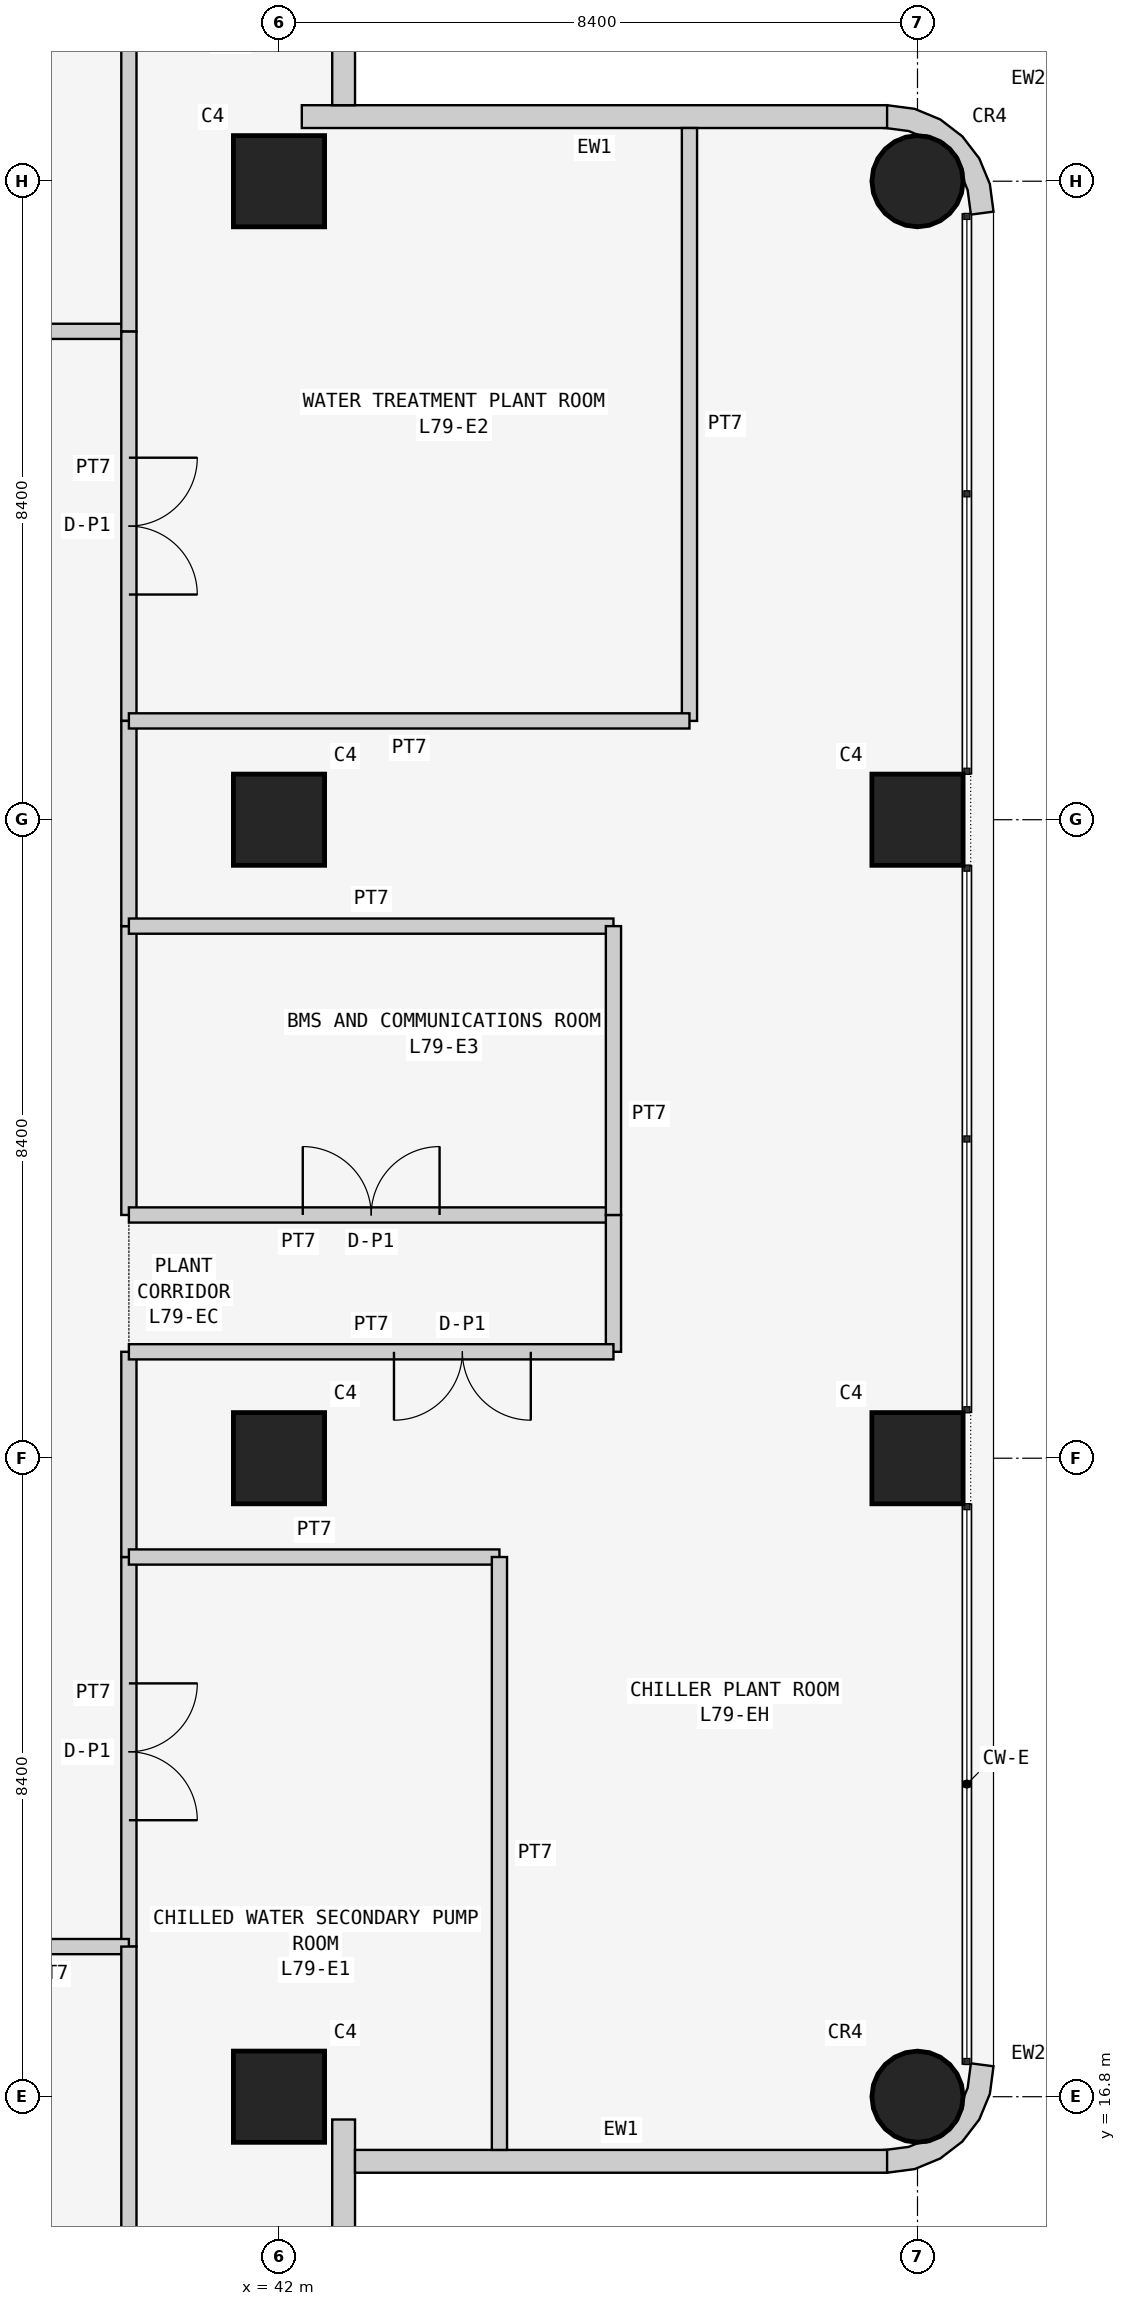
"""IFC4 building model, lengths in metres.
Left out: names, types, materials, properties, quantities, classifications, styles, units other than length and angle.
Written with IfcOpenShell. Run it as: python <this file> out.ifc"""

import sys

from ifc_helpers import new_model, si_unit, direction, frame, frame_2d, origin, origin_2d, place, context, subcontext, project, spatial, polyline, rectangle, circle, outline, extrude, element, fill, save


model = new_model("IFC4")
c1 = context("Model", 3, precision=1e-05, world=origin(), true_north=direction((0.0, 1.0)))
c2 = subcontext(c1, "Body", "Model", "MODEL_VIEW")
j1 = project(units=[si_unit("LENGTHUNIT", "METRE"), si_unit("PLANEANGLEUNIT", "RADIAN")], contexts=[c1])
p1 = place(None, origin())
s1 = spatial("IfcSite", under=j1, at=p1, CompositionType="ELEMENT")
p2 = place(p1, origin())
s2 = spatial("IfcBuilding", under=s1, at=p2, CompositionType="ELEMENT")
p3 = place(p2, frame((0.0, 0.0, 300.9)))
s3 = spatial("IfcBuildingStorey", under=s2, at=p3, CompositionType="ELEMENT", Elevation=300.9)
for number, where, z_axis, x_axis in (
    (1, (42.0, 16.8, 0.0), (0.0, 0.0, 1.0), (1.0, 0.0, 0.0)),
    (2, (42.0, 25.2, 0.0), (0.0, 0.0, 1.0), (1.0, 0.0, 0.0)),
    (3, (42.0, 33.6, 0.0), (0.0, 0.0, 1.0), (1.0, 0.0, 0.0)),
    (4, (42.0, 42.0, 0.0), (0.0, 0.0, 1.0), (1.0, 0.0, 0.0)),
):
    element("IfcColumn", number, at=place(p3, frame(where, z_axis=z_axis, x_axis=x_axis)), inside=s3, PredefinedType="COLUMN", context=c2, shape_type="SweptSolid", body=[
        extrude(rectangle(XDim=1.2, YDim=1.2, at=origin_2d()), origin(), (0.0, 0.0, 1.0), 4.5),
    ])
p4 = place(p3, frame((50.4, 16.8, 0.0), z_axis=(0.0, 0.0, 1.0), x_axis=(1.0, 0.0, 0.0)))
e5 = element("IfcColumn", 5, at=p4, inside=s3, PredefinedType="COLUMN", context=c2, shape_type="SweptSolid", body=[
    extrude(circle(Radius=0.6, at=origin_2d()), origin(), (0.0, 0.0, 1.0), 4.5),
])
for number, where, z_axis, x_axis in (
    (6, (50.4, 25.2, 0.0), (0.0, 0.0, 1.0), (1.0, 0.0, 0.0)),
    (7, (50.4, 33.6, 0.0), (0.0, 0.0, 1.0), (1.0, 0.0, 0.0)),
):
    element("IfcColumn", number, at=place(p3, frame(where, z_axis=z_axis, x_axis=x_axis)), inside=s3, PredefinedType="COLUMN", context=c2, shape_type="SweptSolid", body=[
        extrude(rectangle(XDim=1.2, YDim=1.2, at=origin_2d()), origin(), (0.0, 0.0, 1.0), 4.5),
    ])
p5 = place(p3, frame((50.4, 42.0, 0.0), z_axis=(0.0, 0.0, 1.0), x_axis=(1.0, 0.0, 0.0)))
e8 = element("IfcColumn", 8, at=p5, inside=s3, PredefinedType="COLUMN", context=c2, shape_type="SweptSolid", body=[
    extrude(circle(Radius=0.6, at=origin_2d()), origin(), (0.0, 0.0, 1.0), 4.5),
])
p6 = place(p3, frame((42.85, 8.8, 0.0), z_axis=(0.0, 0.0, 1.0), x_axis=(0.0, 1.0, 0.0)))
e9 = element("IfcWall", 9, at=p6, inside=s3, PredefinedType="SOLIDWALL", context=c2, shape_type="SweptSolid", body=[
    extrude(rectangle(XDim=7.7, YDim=0.3, at=frame_2d((3.85, 0.0))), origin(), (0.0, 0.0, 1.0), 4.25),
])
p7 = place(p3, frame((43.0, 15.95, 0.0), z_axis=(0.0, 0.0, 1.0), x_axis=(1.0, 0.0, 0.0)))
e10 = element("IfcWall", 10, at=p7, inside=s3, PredefinedType="SOLIDWALL", context=c2, shape_type="SweptSolid", body=[
    extrude(rectangle(XDim=7.0, YDim=0.3, at=frame_2d((3.5, 0.0))), origin(), (0.0, 0.0, 1.0), 4.25),
])
p8 = place(p3, frame((50.0, 42.85, 0.0), z_axis=(0.0, 0.0, 1.0), x_axis=(-1.0, 0.0, 0.0)))
e11 = element("IfcWall", 11, at=p8, inside=s3, PredefinedType="SOLIDWALL", context=c2, shape_type="SweptSolid", body=[
    extrude(rectangle(XDim=7.7, YDim=0.3, at=frame_2d((3.85, 0.0))), origin(), (0.0, 0.0, 1.0), 4.25),
])
p9 = place(p3, frame((42.85, 43.0, 0.0), z_axis=(0.0, 0.0, 1.0), x_axis=(0.0, 1.0, 0.0)))
e12 = element("IfcWall", 12, at=p9, inside=s3, PredefinedType="SOLIDWALL", context=c2, shape_type="SweptSolid", body=[
    extrude(rectangle(XDim=7.0, YDim=0.3, at=frame_2d((3.5, 0.0))), origin(), (0.0, 0.0, 1.0), 4.25),
])
p10 = place(p3, frame((50.038, 16.224, 0.0), z_axis=(0.0, 0.0, 1.0), x_axis=(0.707106781187, -0.707106781187, 0.0)))
e13 = element("IfcWall", 13, at=p10, inside=s3, PredefinedType="SOLIDWALL", context=c2, shape_type="SweptSolid", body=[
    extrude(outline(polyline([(0.047, 1.455), (0.233, 1.212), (0.292, 1.069), (0.358, 1.003), (0.449, 0.782), (0.449, 0.543), (0.358, 0.322), (0.292, 0.257), (0.233, 0.114), (0.047, -0.129), (0.033, -0.143), (0.273, -0.327), (0.495, -0.037), (0.635, 0.301), (0.683, 0.663), (0.635, 1.025), (0.495, 1.363), (0.273, 1.653), (0.033, 1.469), (0.047, 1.455)])), origin(), (0.0, 0.0, 1.0), 4.25),
])
p11 = place(p3, frame((50.976, 41.638, 0.0), z_axis=(0.0, 0.0, 1.0), x_axis=(0.707106781187, 0.707106781187, 0.0)))
e14 = element("IfcWall", 14, at=p11, inside=s3, PredefinedType="SOLIDWALL", context=c2, shape_type="SweptSolid", body=[
    extrude(outline(polyline([(0.233, 0.114), (0.047, -0.129), (0.033, -0.143), (0.273, -0.327), (0.495, -0.037), (0.635, 0.301), (0.683, 0.663), (0.635, 1.025), (0.495, 1.363), (0.273, 1.653), (0.033, 1.469), (0.047, 1.455), (0.233, 1.212), (0.292, 1.069), (0.358, 1.003), (0.449, 0.782), (0.449, 0.543), (0.358, 0.322), (0.292, 0.257), (0.233, 0.114)])), origin(), (0.0, 0.0, 1.0), 4.25),
])
p12 = place(p3, frame((34.9, 40.025, 0.0), z_axis=(0.0, 0.0, 1.0), x_axis=(1.0, 0.0, 0.0)))
e15 = element("IfcWall", 15, at=p12, inside=s3, PredefinedType="PARTITIONING", context=c2, shape_type="SweptSolid", body=[
    extrude(rectangle(XDim=5.125, YDim=0.2, at=frame_2d((2.562, 0.0))), origin(), (0.0, 0.0, 1.0), 4.25),
])
p13 = place(p12, frame((1.663, 0.0, 0.0)))
e16 = element("IfcOpeningElement", 16, at=p13, cuts=e15, PredefinedType="OPENING", context=c2, shape_type="SweptSolid", body=[
    extrude(rectangle(XDim=1.8, YDim=2.4, at=frame_2d((0.9, 1.2))), frame((0.0, 0.11, 0.0), z_axis=(0.0, -1.0, 0.0), x_axis=(1.0, 0.0, 0.0)), (0.0, 0.0, 1.0), 0.22),
])
p14 = place(p3, frame((40.025, 23.9, 0.0), z_axis=(0.0, 0.0, 1.0), x_axis=(0.0, -1.0, 0.0)))
e17 = element("IfcWall", 17, at=p14, inside=s3, PredefinedType="PARTITIONING", context=c2, shape_type="SweptSolid", body=[
    extrude(rectangle(XDim=5.125, YDim=0.2, at=frame_2d((2.562, 0.0))), origin(), (0.0, 0.0, 1.0), 4.25),
])
p15 = place(p14, frame((1.663, 0.0, 0.0)))
e18 = element("IfcOpeningElement", 18, at=p15, cuts=e17, PredefinedType="OPENING", context=c2, shape_type="SweptSolid", body=[
    extrude(rectangle(XDim=1.8, YDim=2.4, at=frame_2d((0.9, 1.2))), frame((0.0, 0.11, 0.0), z_axis=(0.0, -1.0, 0.0), x_axis=(1.0, 0.0, 0.0)), (0.0, 0.0, 1.0), 0.22),
])
p16 = place(p3, frame((40.025, 40.025, 0.0), z_axis=(0.0, 0.0, 1.0), x_axis=(0.0, -1.0, 0.0)))
e19 = element("IfcWall", 19, at=p16, inside=s3, PredefinedType="PARTITIONING", context=c2, shape_type="SweptSolid", body=[
    extrude(rectangle(XDim=5.125, YDim=0.2, at=frame_2d((2.562, 0.0))), origin(), (0.0, 0.0, 1.0), 4.25),
])
p17 = place(p16, frame((1.663, 0.0, 0.0)))
e20 = element("IfcOpeningElement", 20, at=p17, cuts=e19, PredefinedType="OPENING", context=c2, shape_type="SweptSolid", body=[
    extrude(rectangle(XDim=1.8, YDim=2.4, at=frame_2d((0.9, 1.2))), frame((0.0, 0.11, 0.0), z_axis=(0.0, -1.0, 0.0), x_axis=(1.0, 0.0, 0.0)), (0.0, 0.0, 1.0), 0.22),
])
p18 = place(p3, frame((40.025, 32.2, 0.0), z_axis=(0.0, 0.0, 1.0), x_axis=(0.0, -1.0, 0.0)))
e21 = element("IfcWall", 21, at=p18, inside=s3, PredefinedType="PARTITIONING", context=c2, shape_type="SweptSolid", body=[
    extrude(rectangle(XDim=3.8, YDim=0.2, at=frame_2d((1.9, 0.0))), origin(), (0.0, 0.0, 1.0), 4.25),
])
p19 = place(p3, frame((40.025, 26.6, 0.0), z_axis=(0.0, 0.0, 1.0), x_axis=(0.0, -1.0, 0.0)))
e22 = element("IfcWall", 22, at=p19, inside=s3, PredefinedType="PARTITIONING", context=c2, shape_type="SweptSolid", body=[
    extrude(rectangle(XDim=2.7, YDim=0.2, at=frame_2d((1.35, 0.0))), origin(), (0.0, 0.0, 1.0), 4.25),
])
p20 = place(p3, frame((40.025, 34.9, 0.0), z_axis=(0.0, 0.0, 1.0), x_axis=(0.0, -1.0, 0.0)))
e23 = element("IfcWall", 23, at=p20, inside=s3, PredefinedType="PARTITIONING", context=c2, shape_type="SweptSolid", body=[
    extrude(rectangle(XDim=2.7, YDim=0.2, at=frame_2d((1.35, 0.0))), origin(), (0.0, 0.0, 1.0), 4.25),
])
p21 = place(p3, frame((40.025, 18.775, 0.0), z_axis=(0.0, 0.0, 1.0), x_axis=(-1.0, 0.0, 0.0)))
e24 = element("IfcWall", 24, at=p21, inside=s3, PredefinedType="PARTITIONING", context=c2, shape_type="SweptSolid", body=[
    extrude(rectangle(XDim=5.125, YDim=0.2, at=frame_2d((2.562, 0.0))), origin(), (0.0, 0.0, 1.0), 4.25),
])
p22 = place(p21, frame((1.663, 0.0, 0.0)))
e25 = element("IfcOpeningElement", 25, at=p22, cuts=e24, PredefinedType="OPENING", context=c2, shape_type="SweptSolid", body=[
    extrude(rectangle(XDim=1.8, YDim=2.4, at=frame_2d((0.9, 1.2))), frame((0.0, 0.11, 0.0), z_axis=(0.0, -1.0, 0.0), x_axis=(1.0, 0.0, 0.0)), (0.0, 0.0, 1.0), 0.22),
])
p23 = place(p3, frame((40.025, 44.2, 0.0), z_axis=(0.0, 0.0, 1.0), x_axis=(0.0, -1.0, 0.0)))
e26 = element("IfcWall", 26, at=p23, inside=s3, PredefinedType="PARTITIONING", context=c2, shape_type="SweptSolid", body=[
    extrude(rectangle(XDim=4.175, YDim=0.2, at=frame_2d((2.087, 0.0))), origin(), (0.0, 0.0, 1.0), 4.25),
])
p24 = place(p3, frame((40.025, 23.9, 0.0), z_axis=(0.0, 0.0, 1.0), x_axis=(1.0, 0.0, 0.0)))
e27 = element("IfcWall", 27, at=p24, inside=s3, PredefinedType="PARTITIONING", context=c2, shape_type="SweptSolid", body=[
    extrude(rectangle(XDim=4.875, YDim=0.2, at=frame_2d((2.438, 0.0))), origin(), (0.0, 0.0, 1.0), 4.25),
])
p25 = place(p3, frame((44.9, 23.9, 0.0), z_axis=(0.0, 0.0, 1.0), x_axis=(0.0, -1.0, 0.0)))
e28 = element("IfcWall", 28, at=p25, inside=s3, PredefinedType="PARTITIONING", context=c2, shape_type="SweptSolid", body=[
    extrude(rectangle(XDim=7.8, YDim=0.2, at=frame_2d((3.9, 0.0))), origin(), (0.0, 0.0, 1.0), 4.25),
])
p26 = place(p3, frame((40.025, 14.6, 0.0), z_axis=(0.0, 0.0, 1.0), x_axis=(0.0, 1.0, 0.0)))
e29 = element("IfcWall", 29, at=p26, inside=s3, PredefinedType="PARTITIONING", context=c2, shape_type="SweptSolid", body=[
    extrude(rectangle(XDim=4.175, YDim=0.2, at=frame_2d((2.087, 0.0))), origin(), (0.0, 0.0, 1.0), 4.25),
])
p27 = place(p3, frame((47.4, 42.7, 0.0), z_axis=(0.0, 0.0, 1.0), x_axis=(0.0, -1.0, 0.0)))
e30 = element("IfcWall", 30, at=p27, inside=s3, PredefinedType="PARTITIONING", context=c2, shape_type="SweptSolid", body=[
    extrude(rectangle(XDim=7.8, YDim=0.2, at=frame_2d((3.9, 0.0))), origin(), (0.0, 0.0, 1.0), 4.25),
])
p28 = place(p3, frame((47.4, 34.9, 0.0), z_axis=(0.0, 0.0, 1.0), x_axis=(-1.0, 0.0, 0.0)))
e31 = element("IfcWall", 31, at=p28, inside=s3, PredefinedType="PARTITIONING", context=c2, shape_type="SweptSolid", body=[
    extrude(rectangle(XDim=7.375, YDim=0.2, at=frame_2d((3.688, 0.0))), origin(), (0.0, 0.0, 1.0), 4.25),
])
p29 = place(p3, frame((40.025, 28.4, 0.0), z_axis=(0.0, 0.0, 1.0), x_axis=(1.0, 0.0, 0.0)))
e32 = element("IfcWall", 32, at=p29, inside=s3, PredefinedType="PARTITIONING", context=c2, shape_type="SweptSolid", body=[
    extrude(rectangle(XDim=6.375, YDim=0.2, at=frame_2d((3.188, 0.0))), origin(), (0.0, 0.0, 1.0), 4.25),
])
p30 = place(p29, frame((2.288, 0.0, 0.0)))
e33 = element("IfcOpeningElement", 33, at=p30, cuts=e32, PredefinedType="OPENING", context=c2, shape_type="SweptSolid", body=[
    extrude(rectangle(XDim=1.8, YDim=2.4, at=frame_2d((0.9, 1.2))), frame((0.0, 0.11, 0.0), z_axis=(0.0, -1.0, 0.0), x_axis=(1.0, 0.0, 0.0)), (0.0, 0.0, 1.0), 0.22),
])
p31 = place(p3, frame((46.4, 28.4, 0.0), z_axis=(0.0, 0.0, 1.0), x_axis=(0.0, -1.0, 0.0)))
e34 = element("IfcWall", 34, at=p31, inside=s3, PredefinedType="PARTITIONING", context=c2, shape_type="SweptSolid", body=[
    extrude(rectangle(XDim=1.8, YDim=0.2, at=frame_2d((0.9, 0.0))), origin(), (0.0, 0.0, 1.0), 4.25),
])
p32 = place(p3, frame((46.4, 26.6, 0.0), z_axis=(0.0, 0.0, 1.0), x_axis=(-1.0, 0.0, 0.0)))
e35 = element("IfcWall", 35, at=p32, inside=s3, PredefinedType="PARTITIONING", context=c2, shape_type="SweptSolid", body=[
    extrude(rectangle(XDim=6.375, YDim=0.2, at=frame_2d((3.188, 0.0))), origin(), (0.0, 0.0, 1.0), 4.25),
])
p33 = place(p32, frame((1.087, 0.0, 0.0)))
e36 = element("IfcOpeningElement", 36, at=p33, cuts=e35, PredefinedType="OPENING", context=c2, shape_type="SweptSolid", body=[
    extrude(rectangle(XDim=1.8, YDim=2.4, at=frame_2d((0.9, 1.2))), frame((0.0, 0.11, 0.0), z_axis=(0.0, -1.0, 0.0), x_axis=(1.0, 0.0, 0.0)), (0.0, 0.0, 1.0), 0.22),
])
p34 = place(p3, frame((40.025, 32.2, 0.0), z_axis=(0.0, 0.0, 1.0), x_axis=(1.0, 0.0, 0.0)))
e37 = element("IfcWall", 37, at=p34, inside=s3, PredefinedType="PARTITIONING", context=c2, shape_type="SweptSolid", body=[
    extrude(rectangle(XDim=6.375, YDim=0.2, at=frame_2d((3.188, 0.0))), origin(), (0.0, 0.0, 1.0), 4.25),
])
p35 = place(p3, frame((46.4, 32.2, 0.0), z_axis=(0.0, 0.0, 1.0), x_axis=(0.0, -1.0, 0.0)))
e38 = element("IfcWall", 38, at=p35, inside=s3, PredefinedType="PARTITIONING", context=c2, shape_type="SweptSolid", body=[
    extrude(rectangle(XDim=3.8, YDim=0.2, at=frame_2d((1.9, 0.0))), origin(), (0.0, 0.0, 1.0), 4.25),
])
p36 = place(p15, origin())
e39 = element("IfcDoor", 39, at=p36, inside=s3, OperationType="DOUBLE_DOOR_SINGLE_SWING", PredefinedType="DOOR", context=c2, shape_type="SweptSolid", body=[
    extrude(rectangle(XDim=1.8, YDim=2.4, at=frame_2d((0.9, 1.2))), frame((0.0, 0.025, 0.0), z_axis=(0.0, -1.0, 0.0), x_axis=(1.0, 0.0, 0.0)), (0.0, 0.0, 1.0), 0.05),
])
fill(e18, e39)
p37 = place(p17, origin())
e40 = element("IfcDoor", 40, at=p37, inside=s3, OperationType="DOUBLE_DOOR_SINGLE_SWING", PredefinedType="DOOR", context=c2, shape_type="SweptSolid", body=[
    extrude(rectangle(XDim=1.8, YDim=2.4, at=frame_2d((0.9, 1.2))), frame((0.0, 0.025, 0.0), z_axis=(0.0, -1.0, 0.0), x_axis=(1.0, 0.0, 0.0)), (0.0, 0.0, 1.0), 0.05),
])
fill(e20, e40)
p38 = place(p30, origin())
e41 = element("IfcDoor", 41, at=p38, inside=s3, OperationType="DOUBLE_DOOR_SINGLE_SWING", PredefinedType="DOOR", context=c2, shape_type="SweptSolid", body=[
    extrude(rectangle(XDim=1.8, YDim=2.4, at=frame_2d((0.9, 1.2))), frame((0.0, 0.025, 0.0), z_axis=(0.0, -1.0, 0.0), x_axis=(1.0, 0.0, 0.0)), (0.0, 0.0, 1.0), 0.05),
])
fill(e33, e41)
p39 = place(p33, origin())
e42 = element("IfcDoor", 42, at=p39, inside=s3, OperationType="DOUBLE_DOOR_SINGLE_SWING", PredefinedType="DOOR", context=c2, shape_type="SweptSolid", body=[
    extrude(rectangle(XDim=1.8, YDim=2.4, at=frame_2d((0.9, 1.2))), frame((0.0, 0.025, 0.0), z_axis=(0.0, -1.0, 0.0), x_axis=(1.0, 0.0, 0.0)), (0.0, 0.0, 1.0), 0.05),
])
fill(e36, e42)
save(model, sys.argv[1])
